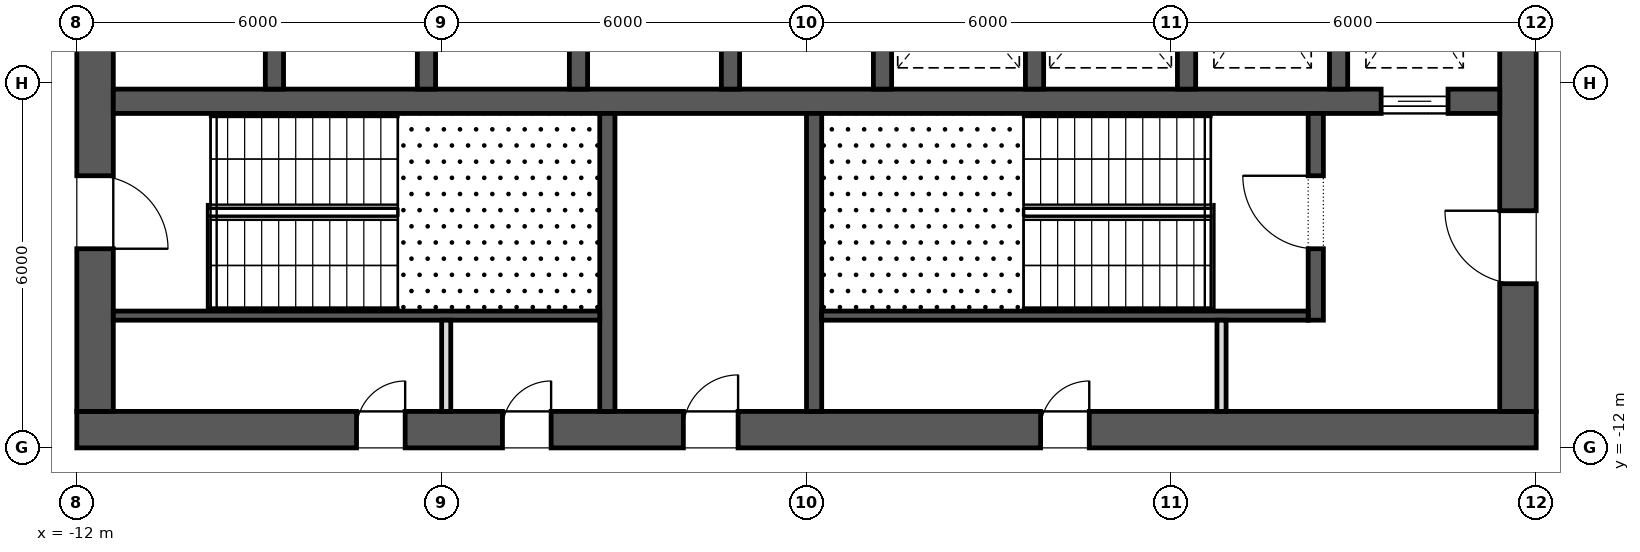
"""IFC4 building model, lengths in metres.
Left out: names, types, materials, properties, quantities, classifications, styles, units other than length and angle.
Written with IfcOpenShell. Run it as: python <this file> out.ifc"""

import sys

from ifc_helpers import new_model, si_unit, direction, frame, frame_2d, origin, place, context, subcontext, project, spatial, rectangle, extrude, element, fill, save


model = new_model("IFC4")
c1 = context("Model", 3, precision=1e-05, world=origin(), true_north=direction((0.0, 1.0)))
c2 = subcontext(c1, "Body", "Model", "MODEL_VIEW")
j1 = project(units=[si_unit("LENGTHUNIT", "METRE"), si_unit("PLANEANGLEUNIT", "RADIAN")], contexts=[c1])
p1 = place(None, origin())
s1 = spatial("IfcSite", under=j1, at=p1, CompositionType="ELEMENT")
p2 = place(p1, origin())
s2 = spatial("IfcBuilding", under=s1, at=p2, CompositionType="ELEMENT")
p3 = place(p2, frame((0.0, 0.0, 31.9)))
s3 = spatial("IfcBuildingStorey", under=s2, at=p3, CompositionType="ELEMENT", Elevation=31.9)
p4 = place(p3, frame((-12.0, -11.7, 0.0), z_axis=(0.0, 0.0, 1.0), x_axis=(1.0, 0.0, 0.0)))
e1 = element("IfcWall", 1, at=p4, inside=s3, PredefinedType="SHEAR", context=c2, shape_type="SweptSolid", body=[
    extrude(rectangle(XDim=24.0, YDim=0.6, at=frame_2d((12.0, 0.0))), origin(), (0.0, 0.0, 1.0), 4.2),
])
p5 = place(p4, frame((9.975, 0.0, 0.0)))
e2 = element("IfcOpeningElement", 2, at=p5, cuts=e1, PredefinedType="OPENING", context=c2, shape_type="SweptSolid", body=[
    extrude(rectangle(XDim=0.9, YDim=2.1, at=frame_2d((0.45, 1.05))), frame((0.0, 0.312, 0.0), z_axis=(0.0, -1.0, 0.0), x_axis=(1.0, 0.0, 0.0)), (0.0, 0.0, 1.0), 0.624),
])
p6 = place(p4, frame((4.6, 0.0, 0.0)))
e3 = element("IfcOpeningElement", 3, at=p6, cuts=e1, PredefinedType="OPENING", context=c2, shape_type="SweptSolid", body=[
    extrude(rectangle(XDim=0.8, YDim=2.1, at=frame_2d((0.4, 1.05))), frame((0.0, 0.312, 0.0), z_axis=(0.0, -1.0, 0.0), x_axis=(1.0, 0.0, 0.0)), (0.0, 0.0, 1.0), 0.624),
])
p7 = place(p4, frame((7.0, 0.0, 0.0)))
e4 = element("IfcOpeningElement", 4, at=p7, cuts=e1, PredefinedType="OPENING", context=c2, shape_type="SweptSolid", body=[
    extrude(rectangle(XDim=0.8, YDim=2.1, at=frame_2d((0.4, 1.05))), frame((0.0, 0.312, 0.0), z_axis=(0.0, -1.0, 0.0), x_axis=(1.0, 0.0, 0.0)), (0.0, 0.0, 1.0), 0.624),
])
p8 = place(p4, frame((15.85, 0.0, 0.0)))
e5 = element("IfcOpeningElement", 5, at=p8, cuts=e1, PredefinedType="OPENING", context=c2, shape_type="SweptSolid", body=[
    extrude(rectangle(XDim=0.8, YDim=2.1, at=frame_2d((0.4, 1.05))), frame((0.0, 0.312, 0.0), z_axis=(0.0, -1.0, 0.0), x_axis=(1.0, 0.0, 0.0)), (0.0, 0.0, 1.0), 0.624),
])
p9 = place(p3, frame((11.7, -11.4, 0.0), z_axis=(0.0, 0.0, 1.0), x_axis=(0.0, 1.0, 0.0)))
e6 = element("IfcWall", 6, at=p9, inside=s3, PredefinedType="SHEAR", context=c2, shape_type="SweptSolid", body=[
    extrude(rectangle(XDim=22.8, YDim=0.6, at=frame_2d((11.4, 0.0))), origin(), (0.0, 0.0, 1.0), 4.2),
])
p10 = place(p9, frame((10.2, 0.0, 0.0)))
e7 = element("IfcOpeningElement", 7, at=p10, cuts=e6, PredefinedType="OPENING", context=c2, shape_type="SweptSolid", body=[
    extrude(rectangle(XDim=2.4, YDim=2.1, at=frame_2d((1.2, 1.05))), frame((0.0, 0.312, 0.0), z_axis=(0.0, -1.0, 0.0), x_axis=(1.0, 0.0, 0.0)), (0.0, 0.0, 1.0), 0.624),
])
p11 = place(p9, frame((19.5, 0.0, 0.0)))
e8 = element("IfcOpeningElement", 8, at=p11, cuts=e6, PredefinedType="OPENING", context=c2, shape_type="SweptSolid", body=[
    extrude(rectangle(XDim=1.2, YDim=2.1, at=frame_2d((0.6, 1.05))), frame((0.0, 0.312, 0.0), z_axis=(0.0, -1.0, 0.0), x_axis=(1.0, 0.0, 0.0)), (0.0, 0.0, 1.0), 0.624),
])
p12 = place(p9, frame((2.1, 0.0, 0.0)))
e9 = element("IfcOpeningElement", 9, at=p12, cuts=e6, PredefinedType="OPENING", context=c2, shape_type="SweptSolid", body=[
    extrude(rectangle(XDim=1.2, YDim=2.1, at=frame_2d((0.6, 1.05))), frame((0.0, 0.312, 0.0), z_axis=(0.0, -1.0, 0.0), x_axis=(1.0, 0.0, 0.0)), (0.0, 0.0, 1.0), 0.624),
])
p13 = place(p3, frame((-11.7, -11.4, 0.0), z_axis=(0.0, 0.0, 1.0), x_axis=(0.0, 1.0, 0.0)))
e10 = element("IfcWall", 10, at=p13, inside=s3, PredefinedType="SHEAR", context=c2, shape_type="SweptSolid", body=[
    extrude(rectangle(XDim=22.8, YDim=0.6, at=frame_2d((11.4, 0.0))), origin(), (0.0, 0.0, 1.0), 4.2),
])
p14 = place(p13, frame((10.2, 0.0, 0.0)))
e11 = element("IfcOpeningElement", 11, at=p14, cuts=e10, PredefinedType="OPENING", context=c2, shape_type="SweptSolid", body=[
    extrude(rectangle(XDim=2.4, YDim=2.1, at=frame_2d((1.2, 1.05))), frame((0.0, 0.312, 0.0), z_axis=(0.0, -1.0, 0.0), x_axis=(1.0, 0.0, 0.0)), (0.0, 0.0, 1.0), 0.624),
])
p15 = place(p13, frame((18.925, 0.0, 0.0)))
e12 = element("IfcOpeningElement", 12, at=p15, cuts=e10, PredefinedType="OPENING", context=c2, shape_type="SweptSolid", body=[
    extrude(rectangle(XDim=1.2, YDim=2.1, at=frame_2d((0.6, 1.05))), frame((0.0, 0.312, 0.0), z_axis=(0.0, -1.0, 0.0), x_axis=(1.0, 0.0, 0.0)), (0.0, 0.0, 1.0), 0.624),
])
p16 = place(p13, frame((2.675, 0.0, 0.0)))
e13 = element("IfcOpeningElement", 13, at=p16, cuts=e10, PredefinedType="OPENING", context=c2, shape_type="SweptSolid", body=[
    extrude(rectangle(XDim=1.2, YDim=2.1, at=frame_2d((0.6, 1.05))), frame((0.0, 0.312, 0.0), z_axis=(0.0, -1.0, 0.0), x_axis=(1.0, 0.0, 0.0)), (0.0, 0.0, 1.0), 0.624),
])
p17 = place(p3, frame((-11.4, -6.3, 0.0), z_axis=(0.0, 0.0, 1.0), x_axis=(1.0, 0.0, 0.0)))
e14 = element("IfcWall", 14, at=p17, inside=s3, PredefinedType="SHEAR", context=c2, shape_type="SweptSolid", body=[
    extrude(rectangle(XDim=22.8, YDim=0.4, at=frame_2d((11.4, 0.0))), origin(), (0.0, 0.0, 1.0), 4.2),
])
p18 = place(p17, frame((20.85, 0.0, 0.0)))
e15 = element("IfcOpeningElement", 15, at=p18, cuts=e14, PredefinedType="OPENING", context=c2, shape_type="SweptSolid", body=[
    extrude(rectangle(XDim=1.1, YDim=2.1, at=frame_2d((0.55, 1.05))), frame((0.0, 0.212, 0.0), z_axis=(0.0, -1.0, 0.0), x_axis=(1.0, 0.0, 0.0)), (0.0, 0.0, 1.0), 0.424),
])
for number, where, z_axis, x_axis in (
    (16, (-8.75, -6.1, 0.0), (0.0, 0.0, 1.0), (0.0, 1.0, 0.0)),
    (17, (-6.25, -6.1, 0.0), (0.0, 0.0, 1.0), (0.0, 1.0, 0.0)),
    (18, (-3.75, -6.1, 0.0), (0.0, 0.0, 1.0), (0.0, 1.0, 0.0)),
    (19, (-1.25, -6.1, 0.0), (0.0, 0.0, 1.0), (0.0, 1.0, 0.0)),
    (20, (1.25, -6.1, 0.0), (0.0, 0.0, 1.0), (0.0, 1.0, 0.0)),
    (21, (3.75, -6.1, 0.0), (0.0, 0.0, 1.0), (0.0, 1.0, 0.0)),
    (22, (6.25, -6.1, 0.0), (0.0, 0.0, 1.0), (0.0, 1.0, 0.0)),
    (23, (8.75, -6.1, 0.0), (0.0, 0.0, 1.0), (0.0, 1.0, 0.0)),
):
    element("IfcWall", number, at=place(p3, frame(where, z_axis=z_axis, x_axis=x_axis)), inside=s3, PredefinedType="SHEAR", context=c2, shape_type="SweptSolid", body=[
        extrude(rectangle(XDim=2.9, YDim=0.3, at=frame_2d((1.45, 0.0))), origin(), (0.0, 0.0, 1.0), 4.2),
    ])
for number, where, z_axis, x_axis in (
    (24, (-3.275, -11.4, 0.0), (0.0, 0.0, 1.0), (0.0, 1.0, 0.0)),
    (25, (0.125, -11.4, 0.0), (0.0, 0.0, 1.0), (0.0, 1.0, 0.0)),
):
    element("IfcWall", number, at=place(p3, frame(where, z_axis=z_axis, x_axis=x_axis)), inside=s3, PredefinedType="SHEAR", context=c2, shape_type="SweptSolid", body=[
        extrude(rectangle(XDim=4.9, YDim=0.25, at=frame_2d((2.45, 0.0))), origin(), (0.0, 0.0, 1.0), 3.9),
    ])
p19 = place(p3, frame((8.375, -9.9, 0.0), z_axis=(0.0, 0.0, 1.0), x_axis=(0.0, 1.0, 0.0)))
e26 = element("IfcWall", 26, at=p19, inside=s3, PredefinedType="SHEAR", context=c2, shape_type="SweptSolid", body=[
    extrude(rectangle(XDim=3.4, YDim=0.25, at=frame_2d((1.7, 0.0))), origin(), (0.0, 0.0, 1.0), 3.9),
])
p20 = place(p19, frame((1.175, 0.0, 0.0)))
e27 = element("IfcOpeningElement", 27, at=p20, cuts=e26, PredefinedType="OPENING", context=c2, shape_type="SweptSolid", body=[
    extrude(rectangle(XDim=1.2, YDim=2.1, at=frame_2d((0.6, 1.05))), frame((0.0, 0.137, 0.0), z_axis=(0.0, -1.0, 0.0), x_axis=(1.0, 0.0, 0.0)), (0.0, 0.0, 1.0), 0.274),
])
for number, where, z_axis, x_axis in (
    (28, (-11.4, -9.825, 0.0), (0.0, 0.0, 1.0), (1.0, 0.0, 0.0)),
    (29, (0.25, -9.825, 0.0), (0.0, 0.0, 1.0), (1.0, 0.0, 0.0)),
):
    element("IfcWall", number, at=place(p3, frame(where, z_axis=z_axis, x_axis=x_axis)), inside=s3, PredefinedType="SHEAR", context=c2, shape_type="SweptSolid", body=[
        extrude(rectangle(XDim=8.0, YDim=0.15, at=frame_2d((4.0, 0.0))), origin(), (0.0, 0.0, 1.0), 3.9),
    ])
for number, where, z_axis, x_axis in (
    (30, (-5.925, -11.4, 0.0), (0.0, 0.0, 1.0), (0.0, 1.0, 0.0)),
    (31, (6.825, -11.4, 0.0), (0.0, 0.0, 1.0), (0.0, 1.0, 0.0)),
):
    element("IfcWall", number, at=place(p3, frame(where, z_axis=z_axis, x_axis=x_axis)), inside=s3, PredefinedType="PARTITIONING", context=c2, shape_type="SweptSolid", body=[
        extrude(rectangle(XDim=1.5, YDim=0.15, at=frame_2d((0.75, 0.0))), origin(), (0.0, 0.0, 1.0), 3.9),
    ])
p21 = place(p18, origin())
e32 = element("IfcDoor", 32, at=p21, inside=s3, OperationType="SLIDING_TO_LEFT", PredefinedType="DOOR", context=c2, shape_type="SweptSolid", body=[
    extrude(rectangle(XDim=1.1, YDim=2.1, at=frame_2d((0.55, 1.05))), frame((0.0, 0.025, 0.0), z_axis=(0.0, -1.0, 0.0), x_axis=(1.0, 0.0, 0.0)), (0.0, 0.0, 1.0), 0.05),
])
fill(e15, e32)
p22 = place(p16, frame((1.2, 0.0, 0.0), z_axis=(0.0, 0.0, 1.0), x_axis=(-1.0, 0.0, 0.0)))
e33 = element("IfcDoor", 33, at=p22, inside=s3, OperationType="SINGLE_SWING_LEFT", PredefinedType="DOOR", context=c2, shape_type="SweptSolid", body=[
    extrude(rectangle(XDim=1.2, YDim=2.1, at=frame_2d((0.6, 1.05))), frame((0.0, 0.025, 0.0), z_axis=(0.0, -1.0, 0.0), x_axis=(1.0, 0.0, 0.0)), (0.0, 0.0, 1.0), 0.05),
])
fill(e13, e33)
p23 = place(p20, origin())
e34 = element("IfcDoor", 34, at=p23, inside=s3, OperationType="SINGLE_SWING_LEFT", PredefinedType="DOOR", context=c2, shape_type="SweptSolid", body=[
    extrude(rectangle(XDim=1.2, YDim=2.1, at=frame_2d((0.6, 1.05))), frame((0.0, 0.025, 0.0), z_axis=(0.0, -1.0, 0.0), x_axis=(1.0, 0.0, 0.0)), (0.0, 0.0, 1.0), 0.05),
])
fill(e27, e34)
p24 = place(p12, origin())
e35 = element("IfcDoor", 35, at=p24, inside=s3, OperationType="SINGLE_SWING_LEFT", PredefinedType="DOOR", context=c2, shape_type="SweptSolid", body=[
    extrude(rectangle(XDim=1.2, YDim=2.1, at=frame_2d((0.6, 1.05))), frame((0.0, 0.025, 0.0), z_axis=(0.0, -1.0, 0.0), x_axis=(1.0, 0.0, 0.0)), (0.0, 0.0, 1.0), 0.05),
])
fill(e9, e35)
p25 = place(p5, origin())
e36 = element("IfcDoor", 36, at=p25, inside=s3, OperationType="SINGLE_SWING_LEFT", PredefinedType="DOOR", context=c2, shape_type="SweptSolid", body=[
    extrude(rectangle(XDim=0.9, YDim=2.1, at=frame_2d((0.45, 1.05))), frame((0.0, 0.025, 0.0), z_axis=(0.0, -1.0, 0.0), x_axis=(1.0, 0.0, 0.0)), (0.0, 0.0, 1.0), 0.05),
])
fill(e2, e36)
p26 = place(p6, origin())
e37 = element("IfcDoor", 37, at=p26, inside=s3, OperationType="SINGLE_SWING_LEFT", PredefinedType="DOOR", context=c2, shape_type="SweptSolid", body=[
    extrude(rectangle(XDim=0.8, YDim=2.1, at=frame_2d((0.4, 1.05))), frame((0.0, 0.025, 0.0), z_axis=(0.0, -1.0, 0.0), x_axis=(1.0, 0.0, 0.0)), (0.0, 0.0, 1.0), 0.05),
])
fill(e3, e37)
p27 = place(p7, origin())
e38 = element("IfcDoor", 38, at=p27, inside=s3, OperationType="SINGLE_SWING_LEFT", PredefinedType="DOOR", context=c2, shape_type="SweptSolid", body=[
    extrude(rectangle(XDim=0.8, YDim=2.1, at=frame_2d((0.4, 1.05))), frame((0.0, 0.025, 0.0), z_axis=(0.0, -1.0, 0.0), x_axis=(1.0, 0.0, 0.0)), (0.0, 0.0, 1.0), 0.05),
])
fill(e4, e38)
p28 = place(p8, origin())
e39 = element("IfcDoor", 39, at=p28, inside=s3, OperationType="SINGLE_SWING_LEFT", PredefinedType="DOOR", context=c2, shape_type="SweptSolid", body=[
    extrude(rectangle(XDim=0.8, YDim=2.1, at=frame_2d((0.4, 1.05))), frame((0.0, 0.025, 0.0), z_axis=(0.0, -1.0, 0.0), x_axis=(1.0, 0.0, 0.0)), (0.0, 0.0, 1.0), 0.05),
])
fill(e5, e39)
save(model, sys.argv[1])
